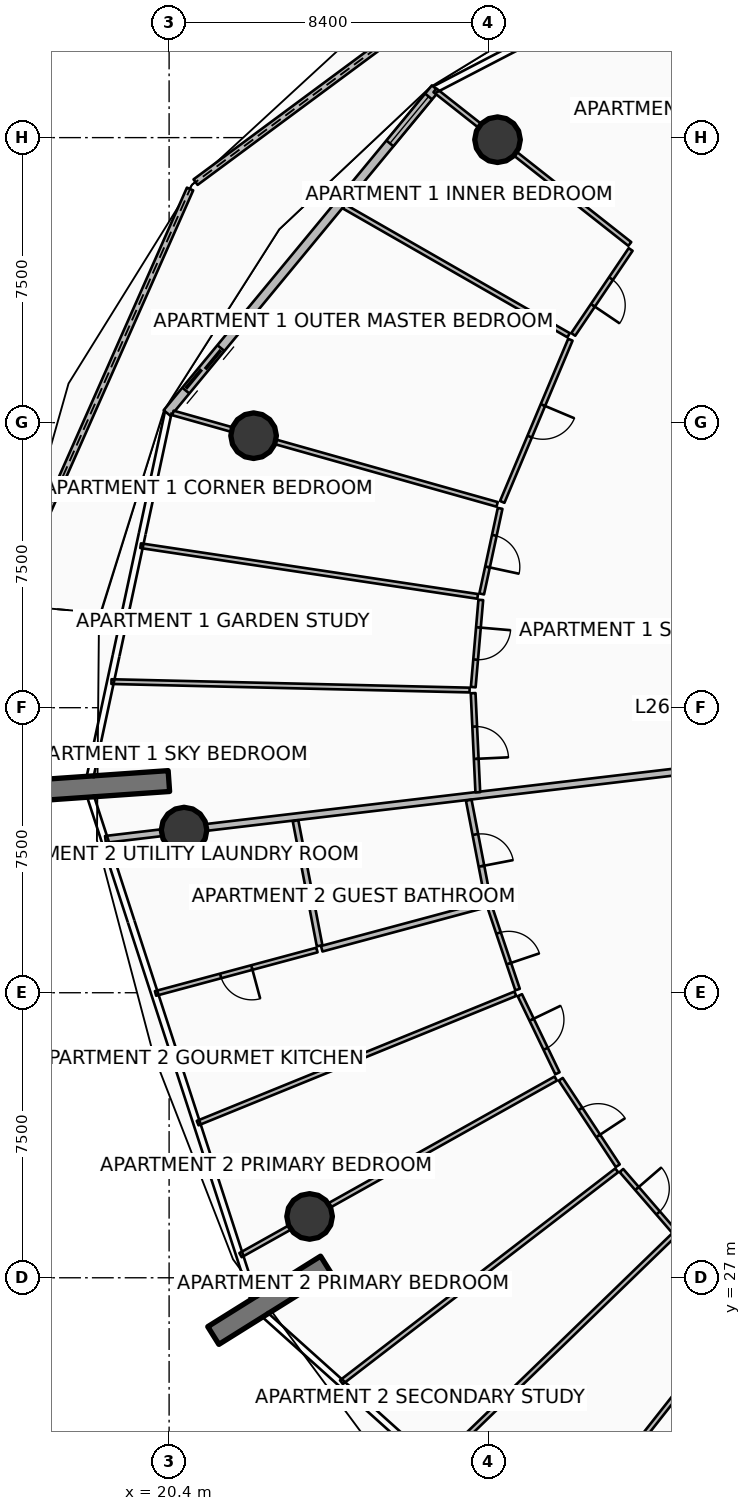
"""IFC4 building model, lengths in metres.
Left out: names, types, materials, properties, quantities, classifications, styles, units other than length and angle.
Written with IfcOpenShell. Run it as: python <this file> out.ifc"""

import sys

from ifc_helpers import new_model, si_unit, direction, frame, frame_2d, origin, origin_2d, place, context, subcontext, project, spatial, polyline, rectangle, circle, outline, extrude, element, fill, save


model = new_model("IFC4")
c1 = context("Model", 3, precision=1e-05, world=origin(), true_north=direction((0.0, 1.0)))
c2 = subcontext(c1, "Body", "Model", "MODEL_VIEW")
j1 = project(units=[si_unit("LENGTHUNIT", "METRE"), si_unit("PLANEANGLEUNIT", "RADIAN")], contexts=[c1])
p1 = place(None, origin())
s1 = spatial("IfcSite", under=j1, at=p1, CompositionType="ELEMENT")
p2 = place(p1, origin())
s2 = spatial("IfcBuilding", under=s1, at=p2, CompositionType="ELEMENT")
p3 = place(p2, frame((0.0, 0.0, 105.15)))
s3 = spatial("IfcBuildingStorey", under=s2, at=p3, CompositionType="ELEMENT", Elevation=105.15)
for number, where, z_axis, x_axis in (
    (1, (20.394, 40.07, 0.0), (0.0, 0.0, 1.0), (-0.998, -0.07, 0.0)),
    (2, (24.531, 27.335, 0.0), (0.0, 0.0, 1.0), (-0.848, -0.53, 0.0)),
):
    element("IfcWall", number, at=place(p3, frame(where, z_axis=z_axis, x_axis=x_axis)), inside=s3, PredefinedType="SOLIDWALL", context=c2, shape_type="SweptSolid", body=[
        extrude(rectangle(XDim=3.5, YDim=0.55, at=frame_2d((1.75, 0.0))), origin(), (0.0, 0.0, 1.0), 3.75),
    ])
for number, where, z_axis, x_axis in (
    (3, (29.042, 56.945, 0.0), (0.0, 0.0, 1.0), (1.0, 0.0, 0.0)),
    (4, (22.623, 49.157, 0.0), (0.0, 0.0, 1.0), (1.0, 0.0, 0.0)),
    (5, (20.793, 38.78, 0.0), (0.0, 0.0, 1.0), (1.0, 0.0, 0.0)),
    (6, (24.097, 28.614, 0.0), (0.0, 0.0, 1.0), (1.0, 0.0, 0.0)),
):
    element("IfcColumn", number, at=place(p3, frame(where, z_axis=z_axis, x_axis=x_axis)), inside=s3, PredefinedType="COLUMN", context=c2, shape_type="SweptSolid", body=[
        extrude(circle(Radius=0.6, at=origin_2d()), origin(), (0.0, 0.0, 1.0), 3.5),
    ])
p4 = place(p3, frame((30.208, 62.576, 0.0), z_axis=(0.0, 0.0, 1.0), x_axis=(-0.803659411402, -0.59508953147, 0.0)))
e7 = element("IfcWall", 7, at=p4, inside=s3, PredefinedType="PARAPET", context=c2, shape_type="SweptSolid", body=[
    extrude(outline(polyline([(0.0, 0.0), (11.338, 0.0), (11.338, 1.832), (5.669, 1.696), (0.0, 1.497), (0.0, 0.0)])), frame((0.0, 0.09, 0.0), z_axis=(0.0, -1.0, 0.0), x_axis=(1.0, 0.0, 0.0)), (0.0, 0.0, 1.0), 0.18),
])
p5 = place(p3, frame((20.951, 55.648, 0.0), z_axis=(0.0, 0.0, 1.0), x_axis=(-0.404780674035, -0.914413804537, 0.0)))
e8 = element("IfcWall", 8, at=p5, inside=s3, PredefinedType="PARAPET", context=c2, shape_type="SweptSolid", body=[
    extrude(outline(polyline([(0.0, 0.0), (11.966, 0.0), (11.966, 1.756), (5.983, 1.853), (0.0, 1.832), (0.0, 0.0)])), frame((0.0, 0.09, 0.0), z_axis=(0.0, -1.0, 0.0), x_axis=(1.0, 0.0, 0.0)), (0.0, 0.0, 1.0), 0.18),
])
p6 = place(p3, frame((27.407, 58.298, 0.0), z_axis=(0.0, 0.0, 1.0), x_axis=(-0.636704975, -0.771107498868, 0.0)))
e9 = element("IfcWall", 9, at=p6, inside=s3, PredefinedType="SOLIDWALL", context=c2, shape_type="SweptSolid", body=[
    extrude(rectangle(XDim=11.084, YDim=0.24, at=frame_2d((5.542, 0.0))), origin(), (0.0, 0.0, 1.0), 2.45),
])
p7 = place(p6, frame((8.864, 0.0, 0.0)))
e10 = element("IfcOpeningElement", 10, at=p7, cuts=e9, PredefinedType="OPENING", context=c2, shape_type="SweptSolid", body=[
    extrude(rectangle(XDim=1.45, YDim=2.15, at=frame_2d((0.725, 1.075))), frame((0.0, 0.13, 0.0), z_axis=(0.0, -1.0, 0.0), x_axis=(1.0, 0.0, 0.0)), (0.0, 0.0, 1.0), 0.26),
])
p8 = place(p6, frame((0.28, 0.0, 0.65)))
e11 = element("IfcOpeningElement", 11, at=p8, cuts=e9, PredefinedType="OPENING", context=c2, shape_type="SweptSolid", body=[
    extrude(rectangle(XDim=1.6, YDim=1.5, at=frame_2d((0.8, 0.75))), frame((0.0, 0.13, 0.0), z_axis=(0.0, -1.0, 0.0), x_axis=(1.0, 0.0, 0.0)), (0.0, 0.0, 1.0), 0.26),
])
p9 = place(p3, frame((35.091, 40.472, 0.0), z_axis=(0.0, 0.0, 1.0), x_axis=(-0.99306845132, -0.117537445069, 0.0)))
e12 = element("IfcWall", 12, at=p9, inside=s3, PredefinedType="PARTITIONING", context=c2, shape_type="SweptSolid", body=[
    extrude(rectangle(XDim=16.48, YDim=0.18, at=frame_2d((8.24, 0.0))), origin(), (0.0, 0.0, 1.0), 2.94),
])
p10 = place(p3, frame((32.522, 54.202, 0.0), z_axis=(0.0, 0.0, 1.0), x_axis=(-0.785296086335, 0.619120389574, 0.0)))
e13 = element("IfcWall", 13, at=p10, inside=s3, PredefinedType="PARTITIONING", context=c2, shape_type="SweptSolid", body=[
    extrude(rectangle(XDim=6.529, YDim=0.125, at=frame_2d((3.265, 0.0))), origin(), (0.0, 0.0, 1.0), 2.94),
])
p11 = place(p3, frame((30.912, 51.8, 0.0), z_axis=(0.0, 0.0, 1.0), x_axis=(-0.867452705788, 0.497519651091, 0.0)))
e14 = element("IfcWall", 14, at=p11, inside=s3, PredefinedType="PARTITIONING", context=c2, shape_type="SweptSolid", body=[
    extrude(rectangle(XDim=6.814, YDim=0.125, at=frame_2d((3.407, 0.0))), origin(), (0.0, 0.0, 1.0), 2.94),
])
p12 = place(p3, frame((32.545, 54.057, 0.0), z_axis=(0.0, 0.0, 1.0), x_axis=(-0.559849013212, -0.828594642998, 0.0)))
e15 = element("IfcWall", 15, at=p12, inside=s3, PredefinedType="PARTITIONING", context=c2, shape_type="SweptSolid", body=[
    extrude(rectangle(XDim=2.697, YDim=0.125, at=frame_2d((1.349, 0.0))), origin(), (0.0, 0.0, 1.0), 2.94),
])
p13 = place(p12, frame((0.924, 0.0, 0.0)))
e16 = element("IfcOpeningElement", 16, at=p13, cuts=e15, PredefinedType="OPENING", context=c2, shape_type="SweptSolid", body=[
    extrude(rectangle(XDim=0.85, YDim=2.06, at=frame_2d((0.425, 1.03))), frame((0.0, 0.073, 0.0), z_axis=(0.0, -1.0, 0.0), x_axis=(1.0, 0.0, 0.0)), (0.0, 0.0, 1.0), 0.145),
])
p14 = place(p3, frame((30.959, 51.682, 0.0), z_axis=(0.0, 0.0, 1.0), x_axis=(-0.387377754923, -0.921921078505, 0.0)))
e17 = element("IfcWall", 17, at=p14, inside=s3, PredefinedType="PARTITIONING", context=c2, shape_type="SweptSolid", body=[
    extrude(rectangle(XDim=4.628, YDim=0.125, at=frame_2d((2.314, 0.0))), origin(), (0.0, 0.0, 1.0), 2.94),
])
p15 = place(p14, frame((1.864, 0.0, 0.0)))
e18 = element("IfcOpeningElement", 18, at=p15, cuts=e17, PredefinedType="OPENING", context=c2, shape_type="SweptSolid", body=[
    extrude(rectangle(XDim=0.9, YDim=2.08, at=frame_2d((0.45, 1.04))), frame((0.0, 0.073, 0.0), z_axis=(0.0, -1.0, 0.0), x_axis=(1.0, 0.0, 0.0)), (0.0, 0.0, 1.0), 0.145),
])
p16 = place(p3, frame((29.031, 47.35, 0.0), z_axis=(0.0, 0.0, 1.0), x_axis=(-0.962455027906, 0.271441189317, 0.0)))
e19 = element("IfcWall", 19, at=p16, inside=s3, PredefinedType="PARTITIONING", context=c2, shape_type="SweptSolid", body=[
    extrude(rectangle(XDim=8.862, YDim=0.125, at=frame_2d((4.431, 0.0))), origin(), (0.0, 0.0, 1.0), 2.94),
])
p17 = place(p3, frame((28.52, 44.929, 0.0), z_axis=(0.0, 0.0, 1.0), x_axis=(-0.988886383278, 0.148673201912, 0.0)))
e20 = element("IfcWall", 20, at=p17, inside=s3, PredefinedType="PARTITIONING", context=c2, shape_type="SweptSolid", body=[
    extrude(rectangle(XDim=8.969, YDim=0.125, at=frame_2d((4.485, 0.0))), origin(), (0.0, 0.0, 1.0), 2.94),
])
p18 = place(p3, frame((28.306, 42.464, 0.0), z_axis=(0.0, 0.0, 1.0), x_axis=(-0.999722179252, 0.023570411771, 0.0)))
e21 = element("IfcWall", 21, at=p18, inside=s3, PredefinedType="PARTITIONING", context=c2, shape_type="SweptSolid", body=[
    extrude(rectangle(XDim=9.426, YDim=0.125, at=frame_2d((4.713, 0.0))), origin(), (0.0, 0.0, 1.0), 2.94),
])
p19 = place(p3, frame((29.11, 47.244, 0.0), z_axis=(0.0, 0.0, 1.0), x_axis=(-0.210470334655, -0.977600244594, 0.0)))
e22 = element("IfcWall", 22, at=p19, inside=s3, PredefinedType="PARTITIONING", context=c2, shape_type="SweptSolid", body=[
    extrude(rectangle(XDim=2.302, YDim=0.125, at=frame_2d((1.151, 0.0))), origin(), (0.0, 0.0, 1.0), 2.94),
])
p20 = place(p19, frame((0.726, 0.0, 0.0)))
e23 = element("IfcOpeningElement", 23, at=p20, cuts=e22, PredefinedType="OPENING", context=c2, shape_type="SweptSolid", body=[
    extrude(rectangle(XDim=0.85, YDim=2.06, at=frame_2d((0.425, 1.03))), frame((0.0, 0.073, 0.0), z_axis=(0.0, -1.0, 0.0), x_axis=(1.0, 0.0, 0.0)), (0.0, 0.0, 1.0), 0.145),
])
p21 = place(p3, frame((28.602, 44.836, 0.0), z_axis=(0.0, 0.0, 1.0), x_axis=(-0.086309330274, -0.996268387287, 0.0)))
e24 = element("IfcWall", 24, at=p21, inside=s3, PredefinedType="PARTITIONING", context=c2, shape_type="SweptSolid", body=[
    extrude(rectangle(XDim=2.302, YDim=0.125, at=frame_2d((1.151, 0.0))), origin(), (0.0, 0.0, 1.0), 2.94),
])
p22 = place(p21, frame((0.726, 0.0, 0.0)))
e25 = element("IfcOpeningElement", 25, at=p22, cuts=e24, PredefinedType="OPENING", context=c2, shape_type="SweptSolid", body=[
    extrude(rectangle(XDim=0.85, YDim=2.06, at=frame_2d((0.425, 1.03))), frame((0.0, 0.073, 0.0), z_axis=(0.0, -1.0, 0.0), x_axis=(1.0, 0.0, 0.0)), (0.0, 0.0, 1.0), 0.145),
])
p23 = place(p3, frame((28.4, 42.382, 0.0), z_axis=(0.0, 0.0, 1.0), x_axis=(0.047147361322, -0.998887944827, 0.0)))
e26 = element("IfcWall", 26, at=p23, inside=s3, PredefinedType="PARTITIONING", context=c2, shape_type="SweptSolid", body=[
    extrude(rectangle(XDim=2.61, YDim=0.125, at=frame_2d((1.305, 0.0))), origin(), (0.0, 0.0, 1.0), 2.94),
])
p24 = place(p23, frame((0.88, 0.0, 0.0)))
e27 = element("IfcOpeningElement", 27, at=p24, cuts=e26, PredefinedType="OPENING", context=c2, shape_type="SweptSolid", body=[
    extrude(rectangle(XDim=0.85, YDim=2.06, at=frame_2d((0.425, 1.03))), frame((0.0, 0.073, 0.0), z_axis=(0.0, -1.0, 0.0), x_axis=(1.0, 0.0, 0.0)), (0.0, 0.0, 1.0), 0.145),
])
p25 = place(p3, frame((28.285, 39.566, 0.0), z_axis=(0.0, 0.0, 1.0), x_axis=(0.189069796262, -0.98196365113, 0.0)))
e28 = element("IfcWall", 28, at=p25, inside=s3, PredefinedType="PARTITIONING", context=c2, shape_type="SweptSolid", body=[
    extrude(rectangle(XDim=2.687, YDim=0.15, at=frame_2d((1.344, 0.0))), origin(), (0.0, 0.0, 1.0), 2.94),
])
p26 = place(p25, frame((0.918, 0.0, 0.0)))
e29 = element("IfcOpeningElement", 29, at=p26, cuts=e28, PredefinedType="OPENING", context=c2, shape_type="SweptSolid", body=[
    extrude(rectangle(XDim=0.85, YDim=2.06, at=frame_2d((0.425, 1.03))), frame((0.0, 0.085, 0.0), z_axis=(0.0, -1.0, 0.0), x_axis=(1.0, 0.0, 0.0)), (0.0, 0.0, 1.0), 0.17),
])
p27 = place(p3, frame((23.727, 39.027, 0.0), z_axis=(0.0, 0.0, 1.0), x_axis=(0.189106762553, -0.981956532825, 0.0)))
e30 = element("IfcWall", 30, at=p27, inside=s3, PredefinedType="PARTITIONING", context=c2, shape_type="SweptSolid", body=[
    extrude(rectangle(XDim=3.352, YDim=0.15, at=frame_2d((1.676, 0.0))), origin(), (0.0, 0.0, 1.0), 2.94),
])
p28 = place(p3, frame((28.723, 36.816, 0.0), z_axis=(0.0, 0.0, 1.0), x_axis=(-0.965677569119, -0.259743782409, 0.0)))
e31 = element("IfcWall", 31, at=p28, inside=s3, PredefinedType="PARTITIONING", context=c2, shape_type="SweptSolid", body=[
    extrude(rectangle(XDim=4.46, YDim=0.15, at=frame_2d((2.23, 0.0))), origin(), (0.0, 0.0, 1.0), 2.94),
])
p29 = place(p3, frame((24.29, 35.624, 0.0), z_axis=(0.0, 0.0, 1.0), x_axis=(-0.965686463705, -0.259710711787, 0.0)))
e32 = element("IfcWall", 32, at=p29, inside=s3, PredefinedType="PARTITIONING", context=c2, shape_type="SweptSolid", body=[
    extrude(rectangle(XDim=4.398, YDim=0.125, at=frame_2d((2.199, 0.0))), origin(), (0.0, 0.0, 1.0), 2.94),
])
p30 = place(p29, frame((1.774, 0.0, 0.0)))
e33 = element("IfcOpeningElement", 33, at=p30, cuts=e32, PredefinedType="OPENING", context=c2, shape_type="SweptSolid", body=[
    extrude(rectangle(XDim=0.85, YDim=2.06, at=frame_2d((0.425, 1.03))), frame((0.0, 0.073, 0.0), z_axis=(0.0, -1.0, 0.0), x_axis=(1.0, 0.0, 0.0)), (0.0, 0.0, 1.0), 0.145),
])
p31 = place(p3, frame((29.511, 34.473, 0.0), z_axis=(0.0, 0.0, 1.0), x_axis=(-0.926185438401, -0.37706834088, 0.0)))
e34 = element("IfcWall", 34, at=p31, inside=s3, PredefinedType="PARTITIONING", context=c2, shape_type="SweptSolid", body=[
    extrude(rectangle(XDim=9.026, YDim=0.125, at=frame_2d((4.513, 0.0))), origin(), (0.0, 0.0, 1.0), 2.94),
])
p32 = place(p3, frame((28.838, 36.754, 0.0), z_axis=(0.0, 0.0, 1.0), x_axis=(0.31900826941, -0.947751931704, 0.0)))
e35 = element("IfcWall", 35, at=p32, inside=s3, PredefinedType="PARTITIONING", context=c2, shape_type="SweptSolid", body=[
    extrude(rectangle(XDim=2.291, YDim=0.125, at=frame_2d((1.145, 0.0))), origin(), (0.0, 0.0, 1.0), 2.94),
])
p33 = place(p32, frame((0.72, 0.0, 0.0)))
e36 = element("IfcOpeningElement", 36, at=p33, cuts=e35, PredefinedType="OPENING", context=c2, shape_type="SweptSolid", body=[
    extrude(rectangle(XDim=0.85, YDim=2.06, at=frame_2d((0.425, 1.03))), frame((0.0, 0.073, 0.0), z_axis=(0.0, -1.0, 0.0), x_axis=(1.0, 0.0, 0.0)), (0.0, 0.0, 1.0), 0.145),
])
p34 = place(p3, frame((29.629, 34.435, 0.0), z_axis=(0.0, 0.0, 1.0), x_axis=(0.433673987986, -0.901069848649, 0.0)))
e37 = element("IfcWall", 37, at=p34, inside=s3, PredefinedType="PARTITIONING", context=c2, shape_type="SweptSolid", body=[
    extrude(rectangle(XDim=2.281, YDim=0.125, at=frame_2d((1.14, 0.0))), origin(), (0.0, 0.0, 1.0), 2.94),
])
p35 = place(p34, frame((0.715, 0.0, 0.0)))
e38 = element("IfcOpeningElement", 38, at=p35, cuts=e37, PredefinedType="OPENING", context=c2, shape_type="SweptSolid", body=[
    extrude(rectangle(XDim=0.85, YDim=2.06, at=frame_2d((0.425, 1.03))), frame((0.0, 0.073, 0.0), z_axis=(0.0, -1.0, 0.0), x_axis=(1.0, 0.0, 0.0)), (0.0, 0.0, 1.0), 0.145),
])
p36 = place(p3, frame((30.575, 32.241, 0.0), z_axis=(0.0, 0.0, 1.0), x_axis=(-0.872502512898, -0.488609624328, 0.0)))
e39 = element("IfcWall", 39, at=p36, inside=s3, PredefinedType="PARTITIONING", context=c2, shape_type="SweptSolid", body=[
    extrude(rectangle(XDim=9.508, YDim=0.125, at=frame_2d((4.754, 0.0))), origin(), (0.0, 0.0, 1.0), 2.94),
])
p37 = place(p3, frame((32.179, 29.827, 0.0), z_axis=(0.0, 0.0, 1.0), x_axis=(-0.792545547833, -0.609812720932, 0.0)))
e40 = element("IfcWall", 40, at=p37, inside=s3, PredefinedType="PARTITIONING", context=c2, shape_type="SweptSolid", body=[
    extrude(rectangle(XDim=9.141, YDim=0.125, at=frame_2d((4.571, 0.0))), origin(), (0.0, 0.0, 1.0), 2.94),
])
p38 = place(p3, frame((33.665, 28.108, 0.0), z_axis=(0.0, 0.0, 1.0), x_axis=(-0.718119545748, -0.695919764064, 0.0)))
e41 = element("IfcWall", 41, at=p38, inside=s3, PredefinedType="PARTITIONING", context=c2, shape_type="SweptSolid", body=[
    extrude(rectangle(XDim=8.721, YDim=0.125, at=frame_2d((4.36, 0.0))), origin(), (0.0, 0.0, 1.0), 2.94),
])
p39 = place(p3, frame((30.706, 32.223, 0.0), z_axis=(0.0, 0.0, 1.0), x_axis=(0.550682420902, -0.834714844309, 0.0)))
e42 = element("IfcWall", 42, at=p39, inside=s3, PredefinedType="PARTITIONING", context=c2, shape_type="SweptSolid", body=[
    extrude(rectangle(XDim=2.725, YDim=0.125, at=frame_2d((1.362, 0.0))), origin(), (0.0, 0.0, 1.0), 2.94),
])
p40 = place(p39, frame((0.937, 0.0, 0.0)))
e43 = element("IfcOpeningElement", 43, at=p40, cuts=e42, PredefinedType="OPENING", context=c2, shape_type="SweptSolid", body=[
    extrude(rectangle(XDim=0.85, YDim=2.06, at=frame_2d((0.425, 1.03))), frame((0.0, 0.073, 0.0), z_axis=(0.0, -1.0, 0.0), x_axis=(1.0, 0.0, 0.0)), (0.0, 0.0, 1.0), 0.145),
])
p41 = place(p3, frame((32.302, 29.822, 0.0), z_axis=(0.0, 0.0, 1.0), x_axis=(0.653904073591, -0.756577466318, 0.0)))
e44 = element("IfcWall", 44, at=p41, inside=s3, PredefinedType="PARTITIONING", context=c2, shape_type="SweptSolid", body=[
    extrude(rectangle(XDim=2.102, YDim=0.125, at=frame_2d((1.051, 0.0))), origin(), (0.0, 0.0, 1.0), 2.94),
])
p42 = place(p41, frame((0.626, 0.0, 0.0)))
e45 = element("IfcOpeningElement", 45, at=p42, cuts=e44, PredefinedType="OPENING", context=c2, shape_type="SweptSolid", body=[
    extrude(rectangle(XDim=0.85, YDim=2.06, at=frame_2d((0.425, 1.03))), frame((0.0, 0.073, 0.0), z_axis=(0.0, -1.0, 0.0), x_axis=(1.0, 0.0, 0.0)), (0.0, 0.0, 1.0), 0.145),
])
p43 = place(p3, frame((35.635, 26.316, 0.0), z_axis=(0.0, 0.0, 1.0), x_axis=(-0.619089966413, -0.785320070727, 0.0)))
e46 = element("IfcWall", 46, at=p43, inside=s3, PredefinedType="PARTITIONING", context=c2, shape_type="SweptSolid", body=[
    extrude(rectangle(XDim=8.699, YDim=0.125, at=frame_2d((4.35, 0.0))), origin(), (0.0, 0.0, 1.0), 2.94),
])
p44 = place(p7, origin())
e47 = element("IfcDoor", 47, at=p44, inside=s3, OperationType="DOUBLE_DOOR_SLIDING", PredefinedType="DOOR", context=c2, shape_type="SweptSolid", body=[
    extrude(rectangle(XDim=1.45, YDim=2.15, at=frame_2d((0.725, 1.075))), frame((0.0, 0.025, 0.0), z_axis=(0.0, -1.0, 0.0), x_axis=(1.0, 0.0, 0.0)), (0.0, 0.0, 1.0), 0.05),
])
fill(e10, e47)
p45 = place(p8, origin())
e48 = element("IfcWindow", 48, at=p45, inside=s3, PartitioningType="SINGLE_PANEL", PredefinedType="WINDOW", context=c2, shape_type="SweptSolid", body=[
    extrude(rectangle(XDim=1.6, YDim=1.5, at=frame_2d((0.8, 0.75))), frame((0.0, 0.03, 0.0), z_axis=(0.0, -1.0, 0.0), x_axis=(1.0, 0.0, 0.0)), (0.0, 0.0, 1.0), 0.06),
])
fill(e11, e48)
p46 = place(p13, origin())
e49 = element("IfcDoor", 49, at=p46, inside=s3, OperationType="SINGLE_SWING_RIGHT", PredefinedType="DOOR", context=c2, shape_type="SweptSolid", body=[
    extrude(rectangle(XDim=0.85, YDim=2.06, at=frame_2d((0.425, 1.03))), frame((0.0, 0.025, 0.0), z_axis=(0.0, -1.0, 0.0), x_axis=(1.0, 0.0, 0.0)), (0.0, 0.0, 1.0), 0.05),
])
fill(e16, e49)
p47 = place(p15, origin())
e50 = element("IfcDoor", 50, at=p47, inside=s3, OperationType="SINGLE_SWING_LEFT", PredefinedType="DOOR", context=c2, shape_type="SweptSolid", body=[
    extrude(rectangle(XDim=0.9, YDim=2.08, at=frame_2d((0.45, 1.04))), frame((0.0, 0.025, 0.0), z_axis=(0.0, -1.0, 0.0), x_axis=(1.0, 0.0, 0.0)), (0.0, 0.0, 1.0), 0.05),
])
fill(e18, e50)
p48 = place(p20, origin())
e51 = element("IfcDoor", 51, at=p48, inside=s3, OperationType="SINGLE_SWING_RIGHT", PredefinedType="DOOR", context=c2, shape_type="SweptSolid", body=[
    extrude(rectangle(XDim=0.85, YDim=2.06, at=frame_2d((0.425, 1.03))), frame((0.0, 0.025, 0.0), z_axis=(0.0, -1.0, 0.0), x_axis=(1.0, 0.0, 0.0)), (0.0, 0.0, 1.0), 0.05),
])
fill(e23, e51)
p49 = place(p22, origin())
e52 = element("IfcDoor", 52, at=p49, inside=s3, OperationType="SINGLE_SWING_LEFT", PredefinedType="DOOR", context=c2, shape_type="SweptSolid", body=[
    extrude(rectangle(XDim=0.85, YDim=2.06, at=frame_2d((0.425, 1.03))), frame((0.0, 0.025, 0.0), z_axis=(0.0, -1.0, 0.0), x_axis=(1.0, 0.0, 0.0)), (0.0, 0.0, 1.0), 0.05),
])
fill(e25, e52)
p50 = place(p24, origin())
e53 = element("IfcDoor", 53, at=p50, inside=s3, OperationType="SINGLE_SWING_RIGHT", PredefinedType="DOOR", context=c2, shape_type="SweptSolid", body=[
    extrude(rectangle(XDim=0.85, YDim=2.06, at=frame_2d((0.425, 1.03))), frame((0.0, 0.025, 0.0), z_axis=(0.0, -1.0, 0.0), x_axis=(1.0, 0.0, 0.0)), (0.0, 0.0, 1.0), 0.05),
])
fill(e27, e53)
p51 = place(p26, origin())
e54 = element("IfcDoor", 54, at=p51, inside=s3, OperationType="SINGLE_SWING_RIGHT", PredefinedType="DOOR", context=c2, shape_type="SweptSolid", body=[
    extrude(rectangle(XDim=0.85, YDim=2.06, at=frame_2d((0.425, 1.03))), frame((0.0, 0.025, 0.0), z_axis=(0.0, -1.0, 0.0), x_axis=(1.0, 0.0, 0.0)), (0.0, 0.0, 1.0), 0.05),
])
fill(e29, e54)
p52 = place(p30, origin())
e55 = element("IfcDoor", 55, at=p52, inside=s3, OperationType="SINGLE_SWING_LEFT", PredefinedType="DOOR", context=c2, shape_type="SweptSolid", body=[
    extrude(rectangle(XDim=0.85, YDim=2.06, at=frame_2d((0.425, 1.03))), frame((0.0, 0.025, 0.0), z_axis=(0.0, -1.0, 0.0), x_axis=(1.0, 0.0, 0.0)), (0.0, 0.0, 1.0), 0.05),
])
fill(e33, e55)
p53 = place(p33, origin())
e56 = element("IfcDoor", 56, at=p53, inside=s3, OperationType="SINGLE_SWING_RIGHT", PredefinedType="DOOR", context=c2, shape_type="SweptSolid", body=[
    extrude(rectangle(XDim=0.85, YDim=2.06, at=frame_2d((0.425, 1.03))), frame((0.0, 0.025, 0.0), z_axis=(0.0, -1.0, 0.0), x_axis=(1.0, 0.0, 0.0)), (0.0, 0.0, 1.0), 0.05),
])
fill(e36, e56)
p54 = place(p35, origin())
e57 = element("IfcDoor", 57, at=p54, inside=s3, OperationType="SINGLE_SWING_LEFT", PredefinedType="DOOR", context=c2, shape_type="SweptSolid", body=[
    extrude(rectangle(XDim=0.85, YDim=2.06, at=frame_2d((0.425, 1.03))), frame((0.0, 0.025, 0.0), z_axis=(0.0, -1.0, 0.0), x_axis=(1.0, 0.0, 0.0)), (0.0, 0.0, 1.0), 0.05),
])
fill(e38, e57)
p55 = place(p40, origin())
e58 = element("IfcDoor", 58, at=p55, inside=s3, OperationType="SINGLE_SWING_RIGHT", PredefinedType="DOOR", context=c2, shape_type="SweptSolid", body=[
    extrude(rectangle(XDim=0.85, YDim=2.06, at=frame_2d((0.425, 1.03))), frame((0.0, 0.025, 0.0), z_axis=(0.0, -1.0, 0.0), x_axis=(1.0, 0.0, 0.0)), (0.0, 0.0, 1.0), 0.05),
])
fill(e43, e58)
p56 = place(p42, origin())
e59 = element("IfcDoor", 59, at=p56, inside=s3, OperationType="SINGLE_SWING_LEFT", PredefinedType="DOOR", context=c2, shape_type="SweptSolid", body=[
    extrude(rectangle(XDim=0.85, YDim=2.06, at=frame_2d((0.425, 1.03))), frame((0.0, 0.025, 0.0), z_axis=(0.0, -1.0, 0.0), x_axis=(1.0, 0.0, 0.0)), (0.0, 0.0, 1.0), 0.05),
])
fill(e45, e59)
save(model, sys.argv[1])
